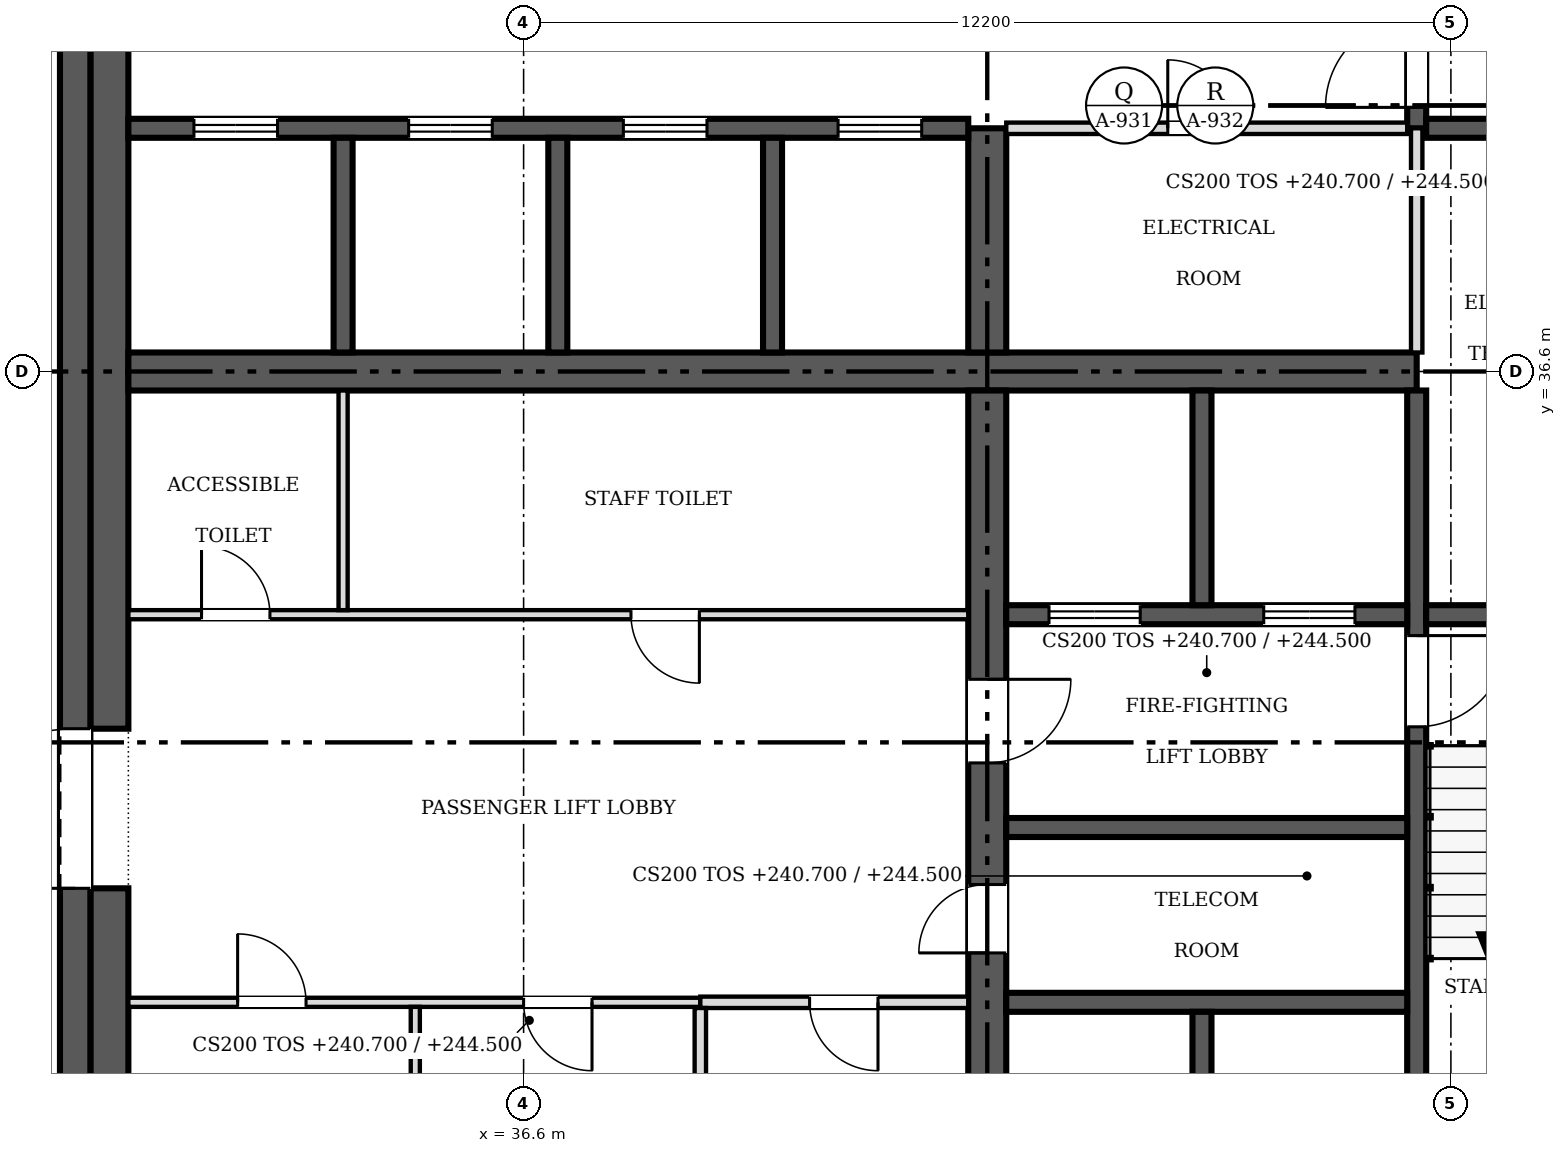
"""IFC4 building model, lengths in metres.
Left out: names, types, materials, properties, quantities, classifications, styles, units other than length and angle.
Written with IfcOpenShell. Run it as: python <this file> out.ifc"""

import sys

from ifc_helpers import new_model, si_unit, direction, frame, frame_2d, origin, place, context, subcontext, project, spatial, rectangle, extrude, source, transform, mapped, element, fill, save


model = new_model("IFC4")
c1 = context("Model", 3, precision=1e-05, world=origin(), true_north=direction((0.0, 1.0)))
c2 = subcontext(c1, "Body", "Model", "MODEL_VIEW")
j1 = project(units=[si_unit("LENGTHUNIT", "METRE"), si_unit("PLANEANGLEUNIT", "RADIAN")], contexts=[c1])
p1 = place(None, origin())
s1 = spatial("IfcSite", under=j1, at=p1, CompositionType="ELEMENT")
p2 = place(p1, origin())
s2 = spatial("IfcBuilding", under=s1, at=p2, CompositionType="ELEMENT")
p3 = place(p2, frame((0.0, 0.0, 240.7)))
s3 = spatial("IfcBuildingStorey", under=s2, at=p3, CompositionType="ELEMENT", Elevation=240.7)
p4 = place(p3, frame((30.7, 24.8, 0.0), z_axis=(0.0, 0.0, 1.0), x_axis=(0.0, 1.0, 0.0)))
e1 = element("IfcWall", 1, at=p4, inside=s3, PredefinedType="SHEAR", context=c2, shape_type="SweptSolid", body=[
    extrude(rectangle(XDim=23.6, YDim=0.4, at=frame_2d((11.8, 0.0))), origin(), (0.0, 0.0, 1.0), 3.8),
])
m1 = source(origin(), c2, "Body", "SweptSolid", [
    extrude(rectangle(XDim=2.1, YDim=2.4, at=frame_2d((1.05, 1.2))), frame((0.0, 0.21, 0.0), z_axis=(0.0, -1.0, 0.0), x_axis=(1.0, 0.0, 0.0)), (0.0, 0.0, 1.0), 0.42),
])
p5 = place(p4, frame((5.0, 0.0, 0.0)))
e2 = element("IfcOpeningElement", 2, at=p5, cuts=e1, PredefinedType="OPENING", context=c2, shape_type="MappedRepresentation", body=[
    mapped(m1, transform((0.0, 0.0, 0.0), scale=1.0)),
])
p6 = place(p4, frame((16.5, 0.0, 0.0)))
e3 = element("IfcOpeningElement", 3, at=p6, cuts=e1, PredefinedType="OPENING", context=c2, shape_type="MappedRepresentation", body=[
    mapped(m1, transform((0.0, 0.0, 0.0), scale=1.0)),
])
p7 = place(p3, frame((31.15, 25.3, 0.0), z_axis=(0.0, 0.0, 1.0), x_axis=(0.0, 1.0, 0.0)))
e4 = element("IfcWall", 4, at=p7, inside=s3, PredefinedType="SOLIDWALL", context=c2, shape_type="SweptSolid", body=[
    extrude(rectangle(XDim=4.5, YDim=0.5, at=frame_2d((2.25, 0.0))), origin(), (0.0, 0.0, 1.0), 3.8),
])
p8 = place(p3, frame((31.15, 31.9, 0.0), z_axis=(0.0, 0.0, 1.0), x_axis=(0.0, 1.0, 0.0)))
e5 = element("IfcWall", 5, at=p8, inside=s3, PredefinedType="SOLIDWALL", context=c2, shape_type="SweptSolid", body=[
    extrude(rectangle(XDim=9.4, YDim=0.5, at=frame_2d((4.7, 0.0))), origin(), (0.0, 0.0, 1.0), 3.8),
])
p9 = place(p3, frame((31.4, 36.6, 0.0), z_axis=(0.0, 0.0, 1.0), x_axis=(1.0, 0.0, 0.0)))
e6 = element("IfcWall", 6, at=p9, inside=s3, PredefinedType="SHEAR", context=c2, shape_type="SweptSolid", body=[
    extrude(rectangle(XDim=16.95, YDim=0.5, at=frame_2d((8.475, 0.0))), origin(), (0.0, 0.0, 1.0), 3.8),
])
p10 = place(p3, frame((42.7, 36.35, 0.0), z_axis=(0.0, 0.0, 1.0), x_axis=(0.0, -1.0, 0.0)))
e7 = element("IfcWall", 7, at=p10, inside=s3, PredefinedType="SHEAR", context=c2, shape_type="SweptSolid", body=[
    extrude(rectangle(XDim=11.05, YDim=0.5, at=frame_2d((5.525, 0.0))), origin(), (0.0, 0.0, 1.0), 3.8),
])
m2 = source(origin(), c2, "Body", "SweptSolid", [
    extrude(rectangle(XDim=0.9, YDim=2.1, at=frame_2d((0.45, 1.05))), frame((0.0, 0.26, 0.0), z_axis=(0.0, -1.0, 0.0), x_axis=(1.0, 0.0, 0.0)), (0.0, 0.0, 1.0), 0.52),
])
p11 = place(p10, frame((6.5, 0.0, 0.0)))
e8 = element("IfcOpeningElement", 8, at=p11, cuts=e7, PredefinedType="OPENING", context=c2, shape_type="MappedRepresentation", body=[
    mapped(m2, transform((0.0, 0.0, 0.0), scale=1.0)),
])
m3 = source(origin(), c2, "Body", "SweptSolid", [
    extrude(rectangle(XDim=1.1, YDim=2.1, at=frame_2d((0.55, 1.05))), frame((0.0, 0.26, 0.0), z_axis=(0.0, -1.0, 0.0), x_axis=(1.0, 0.0, 0.0)), (0.0, 0.0, 1.0), 0.52),
])
p12 = place(p10, frame((3.8, 0.0, 0.0)))
e9 = element("IfcOpeningElement", 9, at=p12, cuts=e7, PredefinedType="OPENING", context=c2, shape_type="MappedRepresentation", body=[
    mapped(m3, transform((0.0, 0.0, 0.0), scale=1.0)),
])
p13 = place(p3, frame((42.7, 36.85, 0.0), z_axis=(0.0, 0.0, 1.0), x_axis=(0.0, 1.0, 0.0)))
e10 = element("IfcWall", 10, at=p13, inside=s3, PredefinedType="SHEAR", context=c2, shape_type="SweptSolid", body=[
    extrude(rectangle(XDim=2.95, YDim=0.5, at=frame_2d((1.475, 0.0))), origin(), (0.0, 0.0, 1.0), 3.8),
])
p14 = place(p3, frame((31.4, 39.8, 0.0), z_axis=(0.0, 0.0, 1.0), x_axis=(1.0, 0.0, 0.0)))
e11 = element("IfcWall", 11, at=p14, inside=s3, PredefinedType="SOLIDWALL", context=c2, shape_type="SweptSolid", body=[
    extrude(rectangle(XDim=11.05, YDim=0.25, at=frame_2d((5.525, 0.0))), origin(), (0.0, 0.0, 1.0), 3.8),
])
m4 = source(origin(), c2, "Body", "SweptSolid", [
    extrude(rectangle(XDim=1.1, YDim=2.1, at=frame_2d((0.55, 1.05))), frame((0.0, 0.135, 0.0), z_axis=(0.0, -1.0, 0.0), x_axis=(1.0, 0.0, 0.0)), (0.0, 0.0, 1.0), 0.27),
])
p15 = place(p14, frame((0.863, 0.0, 0.0)))
e12 = element("IfcOpeningElement", 12, at=p15, cuts=e11, PredefinedType="OPENING", context=c2, shape_type="MappedRepresentation", body=[
    mapped(m4, transform((0.0, 0.0, 0.0), scale=1.0)),
])
p16 = place(p14, frame((3.688, 0.0, 0.0)))
e13 = element("IfcOpeningElement", 13, at=p16, cuts=e11, PredefinedType="OPENING", context=c2, shape_type="MappedRepresentation", body=[
    mapped(m4, transform((0.0, 0.0, 0.0), scale=1.0)),
])
p17 = place(p14, frame((6.512, 0.0, 0.0)))
e14 = element("IfcOpeningElement", 14, at=p17, cuts=e11, PredefinedType="OPENING", context=c2, shape_type="MappedRepresentation", body=[
    mapped(m4, transform((0.0, 0.0, 0.0), scale=1.0)),
])
p18 = place(p14, frame((9.337, 0.0, 0.0)))
e15 = element("IfcOpeningElement", 15, at=p18, cuts=e11, PredefinedType="OPENING", context=c2, shape_type="MappedRepresentation", body=[
    mapped(m4, transform((0.0, 0.0, 0.0), scale=1.0)),
])
p19 = place(p3, frame((48.35, 36.35, 0.0), z_axis=(0.0, 0.0, 1.0), x_axis=(0.0, -1.0, 0.0)))
e16 = element("IfcWall", 16, at=p19, inside=s3, PredefinedType="SOLIDWALL", context=c2, shape_type="SweptSolid", body=[
    extrude(rectangle(XDim=11.05, YDim=0.25, at=frame_2d((5.525, 0.0))), origin(), (0.0, 0.0, 1.0), 3.8),
])
m5 = source(origin(), c2, "Body", "SweptSolid", [
    extrude(rectangle(XDim=1.2, YDim=2.1, at=frame_2d((0.6, 1.05))), frame((0.0, 0.135, 0.0), z_axis=(0.0, -1.0, 0.0), x_axis=(1.0, 0.0, 0.0)), (0.0, 0.0, 1.0), 0.27),
])
p20 = place(p19, frame((3.225, 0.0, 0.0)))
e17 = element("IfcOpeningElement", 17, at=p20, cuts=e16, PredefinedType="OPENING", context=c2, shape_type="MappedRepresentation", body=[
    mapped(m5, transform((0.0, 0.0, 0.0), scale=1.0)),
])
p21 = place(p3, frame((48.225, 33.4, 0.0), z_axis=(0.0, 0.0, 1.0), x_axis=(-1.0, 0.0, 0.0)))
e18 = element("IfcWall", 18, at=p21, inside=s3, PredefinedType="SOLIDWALL", context=c2, shape_type="SweptSolid", body=[
    extrude(rectangle(XDim=5.275, YDim=0.25, at=frame_2d((2.638, 0.0))), origin(), (0.0, 0.0, 1.0), 3.8),
])
p22 = place(p21, frame((3.512, 0.0, 0.0)))
e19 = element("IfcOpeningElement", 19, at=p22, cuts=e18, PredefinedType="OPENING", context=c2, shape_type="MappedRepresentation", body=[
    mapped(m5, transform((0.0, 0.0, 0.0), scale=1.0)),
])
p23 = place(p21, frame((0.688, 0.0, 0.0)))
e20 = element("IfcOpeningElement", 20, at=p23, cuts=e18, PredefinedType="OPENING", context=c2, shape_type="MappedRepresentation", body=[
    mapped(m5, transform((0.0, 0.0, 0.0), scale=1.0)),
])
p24 = place(p3, frame((48.475, 33.4, 0.0), z_axis=(0.0, 0.0, 1.0), x_axis=(1.0, 0.0, 0.0)))
e21 = element("IfcWall", 21, at=p24, inside=s3, PredefinedType="SOLIDWALL", context=c2, shape_type="SweptSolid", body=[
    extrude(rectangle(XDim=3.525, YDim=0.25, at=frame_2d((1.762, 0.0))), origin(), (0.0, 0.0, 1.0), 3.8),
])
p25 = place(p3, frame((48.35, 47.9, 0.0), z_axis=(0.0, 0.0, 1.0), x_axis=(0.0, -1.0, 0.0)))
e22 = element("IfcWall", 22, at=p25, inside=s3, PredefinedType="SOLIDWALL", context=c2, shape_type="SweptSolid", body=[
    extrude(rectangle(XDim=8.1, YDim=0.25, at=frame_2d((4.05, 0.0))), origin(), (0.0, 0.0, 1.0), 3.8),
])
p26 = place(p25, frame((6.625, 0.0, 0.0)))
e23 = element("IfcOpeningElement", 23, at=p26, cuts=e22, PredefinedType="OPENING", context=c2, shape_type="MappedRepresentation", body=[
    mapped(m5, transform((0.0, 0.0, 0.0), scale=1.0)),
])
for number, where, z_axis, x_axis in (
    (24, (42.95, 28.3, 0.0), (0.0, 0.0, 1.0), (1.0, 0.0, 0.0)),
    (25, (42.95, 30.6, 0.0), (0.0, 0.0, 1.0), (1.0, 0.0, 0.0)),
):
    element("IfcWall", number, at=place(p3, frame(where, z_axis=z_axis, x_axis=x_axis)), inside=s3, PredefinedType="SOLIDWALL", context=c2, shape_type="SweptSolid", body=[
        extrude(rectangle(XDim=5.275, YDim=0.25, at=frame_2d((2.638, 0.0))), origin(), (0.0, 0.0, 1.0), 3.8),
    ])
p27 = place(p3, frame((48.475, 39.8, 0.0), z_axis=(0.0, 0.0, 1.0), x_axis=(1.0, 0.0, 0.0)))
e26 = element("IfcWall", 26, at=p27, inside=s3, PredefinedType="SOLIDWALL", context=c2, shape_type="SweptSolid", body=[
    extrude(rectangle(XDim=3.4, YDim=0.25, at=frame_2d((1.7, 0.0))), origin(), (0.0, 0.0, 1.0), 3.8),
])
for number, where, z_axis, x_axis in (
    (27, (34.225, 36.85, 0.0), (0.0, 0.0, 1.0), (0.0, 1.0, 0.0)),
    (28, (37.05, 36.85, 0.0), (0.0, 0.0, 1.0), (0.0, 1.0, 0.0)),
    (29, (39.875, 36.85, 0.0), (0.0, 0.0, 1.0), (0.0, 1.0, 0.0)),
):
    element("IfcWall", number, at=place(p3, frame(where, z_axis=z_axis, x_axis=x_axis)), inside=s3, PredefinedType="SOLIDWALL", context=c2, shape_type="SweptSolid", body=[
        extrude(rectangle(XDim=2.825, YDim=0.25, at=frame_2d((1.413, 0.0))), origin(), (0.0, 0.0, 1.0), 3.8),
    ])
p28 = place(p3, frame((45.525, 33.525, 0.0), z_axis=(0.0, 0.0, 1.0), x_axis=(0.0, 1.0, 0.0)))
e30 = element("IfcWall", 30, at=p28, inside=s3, PredefinedType="SOLIDWALL", context=c2, shape_type="SweptSolid", body=[
    extrude(rectangle(XDim=2.825, YDim=0.25, at=frame_2d((1.413, 0.0))), origin(), (0.0, 0.0, 1.0), 3.8),
])
p29 = place(p3, frame((45.525, 25.3, 0.0), z_axis=(0.0, 0.0, 1.0), x_axis=(0.0, 1.0, 0.0)))
e31 = element("IfcWall", 31, at=p29, inside=s3, PredefinedType="SOLIDWALL", context=c2, shape_type="SweptSolid", body=[
    extrude(rectangle(XDim=2.875, YDim=0.25, at=frame_2d((1.438, 0.0))), origin(), (0.0, 0.0, 1.0), 3.8),
])
p30 = place(p3, frame((31.4, 33.4, 0.0), z_axis=(0.0, 0.0, 1.0), x_axis=(1.0, 0.0, 0.0)))
e32 = element("IfcWall", 32, at=p30, inside=s3, PredefinedType="PARTITIONING", context=c2, shape_type="SweptSolid", body=[
    extrude(rectangle(XDim=11.05, YDim=0.12, at=frame_2d((5.525, 0.0))), origin(), (0.0, 0.0, 1.0), 3.6),
])
m6 = source(origin(), c2, "Body", "SweptSolid", [
    extrude(rectangle(XDim=0.9, YDim=2.1, at=frame_2d((0.45, 1.05))), frame((0.0, 0.07, 0.0), z_axis=(0.0, -1.0, 0.0), x_axis=(1.0, 0.0, 0.0)), (0.0, 0.0, 1.0), 0.14),
])
p31 = place(p30, frame((0.962, 0.0, 0.0)))
e33 = element("IfcOpeningElement", 33, at=p31, cuts=e32, PredefinedType="OPENING", context=c2, shape_type="MappedRepresentation", body=[
    mapped(m6, transform((0.0, 0.0, 0.0), scale=1.0)),
])
p32 = place(p30, frame((6.613, 0.0, 0.0)))
e34 = element("IfcOpeningElement", 34, at=p32, cuts=e32, PredefinedType="OPENING", context=c2, shape_type="MappedRepresentation", body=[
    mapped(m6, transform((0.0, 0.0, 0.0), scale=1.0)),
])
p33 = place(p3, frame((38.925, 28.3, 0.0), z_axis=(0.0, 0.0, 1.0), x_axis=(-1.0, 0.0, 0.0)))
e35 = element("IfcWall", 35, at=p33, inside=s3, PredefinedType="PARTITIONING", context=c2, shape_type="SweptSolid", body=[
    extrude(rectangle(XDim=7.525, YDim=0.12, at=frame_2d((3.763, 0.0))), origin(), (0.0, 0.0, 1.0), 3.6),
])
p34 = place(p33, frame((5.188, 0.0, 0.0)))
e36 = element("IfcOpeningElement", 36, at=p34, cuts=e35, PredefinedType="OPENING", context=c2, shape_type="MappedRepresentation", body=[
    mapped(m6, transform((0.0, 0.0, 0.0), scale=1.0)),
])
p35 = place(p33, frame((1.425, 0.0, 0.0)))
e37 = element("IfcOpeningElement", 37, at=p35, cuts=e35, PredefinedType="OPENING", context=c2, shape_type="MappedRepresentation", body=[
    mapped(m6, transform((0.0, 0.0, 0.0), scale=1.0)),
])
p36 = place(p3, frame((48.225, 39.8, 0.0), z_axis=(0.0, 0.0, 1.0), x_axis=(-1.0, 0.0, 0.0)))
e38 = element("IfcWall", 38, at=p36, inside=s3, PredefinedType="PARTITIONING", context=c2, shape_type="SweptSolid", body=[
    extrude(rectangle(XDim=5.275, YDim=0.15, at=frame_2d((2.638, 0.0))), origin(), (0.0, 0.0, 1.0), 3.6),
])
m7 = source(origin(), c2, "Body", "SweptSolid", [
    extrude(rectangle(XDim=0.9, YDim=2.1, at=frame_2d((0.45, 1.05))), frame((0.0, 0.085, 0.0), z_axis=(0.0, -1.0, 0.0), x_axis=(1.0, 0.0, 0.0)), (0.0, 0.0, 1.0), 0.17),
])
p37 = place(p36, frame((2.25, 0.0, 0.0)))
e39 = element("IfcOpeningElement", 39, at=p37, cuts=e38, PredefinedType="OPENING", context=c2, shape_type="MappedRepresentation", body=[
    mapped(m7, transform((0.0, 0.0, 0.0), scale=1.0)),
])
p38 = place(p3, frame((42.45, 28.3, 0.0), z_axis=(0.0, 0.0, 1.0), x_axis=(-1.0, 0.0, 0.0)))
e40 = element("IfcWall", 40, at=p38, inside=s3, PredefinedType="PARTITIONING", context=c2, shape_type="SweptSolid", body=[
    extrude(rectangle(XDim=3.525, YDim=0.15, at=frame_2d((1.762, 0.0))), origin(), (0.0, 0.0, 1.0), 3.6),
])
p39 = place(p38, frame((1.188, 0.0, 0.0)))
e41 = element("IfcOpeningElement", 41, at=p39, cuts=e40, PredefinedType="OPENING", context=c2, shape_type="MappedRepresentation", body=[
    mapped(m7, transform((0.0, 0.0, 0.0), scale=1.0)),
])
p40 = place(p3, frame((48.35, 36.85, 0.0), z_axis=(0.0, 0.0, 1.0), x_axis=(0.0, 1.0, 0.0)))
e42 = element("IfcWall", 42, at=p40, inside=s3, PredefinedType="PARTITIONING", context=c2, shape_type="SweptSolid", body=[
    extrude(rectangle(XDim=2.95, YDim=0.15, at=frame_2d((1.475, 0.0))), origin(), (0.0, 0.0, 1.0), 3.6),
])
p41 = place(p3, frame((34.225, 33.46, 0.0), z_axis=(0.0, 0.0, 1.0), x_axis=(0.0, 1.0, 0.0)))
e43 = element("IfcWall", 43, at=p41, inside=s3, PredefinedType="PARTITIONING", context=c2, shape_type="SweptSolid", body=[
    extrude(rectangle(XDim=2.89, YDim=0.12, at=frame_2d((1.445, 0.0))), origin(), (0.0, 0.0, 1.0), 3.6),
])
p42 = place(p3, frame((35.175, 25.3, 0.0), z_axis=(0.0, 0.0, 1.0), x_axis=(0.0, 1.0, 0.0)))
e44 = element("IfcWall", 44, at=p42, inside=s3, PredefinedType="PARTITIONING", context=c2, shape_type="SweptSolid", body=[
    extrude(rectangle(XDim=2.94, YDim=0.12, at=frame_2d((1.47, 0.0))), origin(), (0.0, 0.0, 1.0), 3.6),
])
p43 = place(p3, frame((38.925, 25.3, 0.0), z_axis=(0.0, 0.0, 1.0), x_axis=(0.0, 1.0, 0.0)))
e45 = element("IfcWall", 45, at=p43, inside=s3, PredefinedType="PARTITIONING", context=c2, shape_type="SweptSolid", body=[
    extrude(rectangle(XDim=2.925, YDim=0.15, at=frame_2d((1.462, 0.0))), origin(), (0.0, 0.0, 1.0), 3.6),
])
m8 = source(origin(), c2, "Body", "SweptSolid", [
    extrude(rectangle(XDim=2.1, YDim=2.4, at=frame_2d((1.05, 1.2))), frame((0.0, 0.025, 0.0), z_axis=(0.0, -1.0, 0.0), x_axis=(1.0, 0.0, 0.0)), (0.0, 0.0, 1.0), 0.05),
])
p44 = place(p5, origin())
e46 = element("IfcDoor", 46, at=p44, inside=s3, OperationType="DOUBLE_DOOR_SINGLE_SWING", PredefinedType="DOOR", context=c2, shape_type="MappedRepresentation", body=[
    mapped(m8, transform((0.0, 0.0, 0.0), scale=1.0)),
])
fill(e2, e46)
m9 = source(origin(), c2, "Body", "SweptSolid", [
    extrude(rectangle(XDim=0.9, YDim=2.1, at=frame_2d((0.45, 1.05))), frame((0.0, 0.025, 0.0), z_axis=(0.0, -1.0, 0.0), x_axis=(1.0, 0.0, 0.0)), (0.0, 0.0, 1.0), 0.05),
])
p45 = place(p11, origin())
e47 = element("IfcDoor", 47, at=p45, inside=s3, OperationType="SINGLE_SWING_RIGHT", PredefinedType="DOOR", context=c2, shape_type="MappedRepresentation", body=[
    mapped(m9, transform((0.0, 0.0, 0.0), scale=1.0)),
])
fill(e8, e47)
m10 = source(origin(), c2, "Body", "SweptSolid", [
    extrude(rectangle(XDim=1.1, YDim=2.1, at=frame_2d((0.55, 1.05))), frame((0.0, 0.025, 0.0), z_axis=(0.0, -1.0, 0.0), x_axis=(1.0, 0.0, 0.0)), (0.0, 0.0, 1.0), 0.05),
])
p46 = place(p12, origin())
e48 = element("IfcDoor", 48, at=p46, inside=s3, OperationType="SINGLE_SWING_LEFT", PredefinedType="DOOR", context=c2, shape_type="MappedRepresentation", body=[
    mapped(m10, transform((0.0, 0.0, 0.0), scale=1.0)),
])
fill(e9, e48)
p47 = place(p15, origin())
e49 = element("IfcDoor", 49, at=p47, inside=s3, OperationType="DOUBLE_DOOR_SLIDING", PredefinedType="DOOR", context=c2, shape_type="MappedRepresentation", body=[
    mapped(m10, transform((0.0, 0.0, 0.0), scale=1.0)),
])
fill(e12, e49)
p48 = place(p16, origin())
e50 = element("IfcDoor", 50, at=p48, inside=s3, OperationType="DOUBLE_DOOR_SLIDING", PredefinedType="DOOR", context=c2, shape_type="MappedRepresentation", body=[
    mapped(m10, transform((0.0, 0.0, 0.0), scale=1.0)),
])
fill(e13, e50)
p49 = place(p17, origin())
e51 = element("IfcDoor", 51, at=p49, inside=s3, OperationType="DOUBLE_DOOR_SLIDING", PredefinedType="DOOR", context=c2, shape_type="MappedRepresentation", body=[
    mapped(m10, transform((0.0, 0.0, 0.0), scale=1.0)),
])
fill(e14, e51)
p50 = place(p18, origin())
e52 = element("IfcDoor", 52, at=p50, inside=s3, OperationType="DOUBLE_DOOR_SLIDING", PredefinedType="DOOR", context=c2, shape_type="MappedRepresentation", body=[
    mapped(m10, transform((0.0, 0.0, 0.0), scale=1.0)),
])
fill(e15, e52)
m11 = source(origin(), c2, "Body", "SweptSolid", [
    extrude(rectangle(XDim=1.2, YDim=2.1, at=frame_2d((0.6, 1.05))), frame((0.0, 0.025, 0.0), z_axis=(0.0, -1.0, 0.0), x_axis=(1.0, 0.0, 0.0)), (0.0, 0.0, 1.0), 0.05),
])
p51 = place(p20, origin())
e53 = element("IfcDoor", 53, at=p51, inside=s3, OperationType="SINGLE_SWING_LEFT", PredefinedType="DOOR", context=c2, shape_type="MappedRepresentation", body=[
    mapped(m11, transform((0.0, 0.0, 0.0), scale=1.0)),
])
fill(e17, e53)
p52 = place(p22, origin())
e54 = element("IfcDoor", 54, at=p52, inside=s3, OperationType="DOUBLE_DOOR_SLIDING", PredefinedType="DOOR", context=c2, shape_type="MappedRepresentation", body=[
    mapped(m11, transform((0.0, 0.0, 0.0), scale=1.0)),
])
fill(e19, e54)
p53 = place(p23, origin())
e55 = element("IfcDoor", 55, at=p53, inside=s3, OperationType="DOUBLE_DOOR_SLIDING", PredefinedType="DOOR", context=c2, shape_type="MappedRepresentation", body=[
    mapped(m11, transform((0.0, 0.0, 0.0), scale=1.0)),
])
fill(e20, e55)
p54 = place(p26, origin())
e56 = element("IfcDoor", 56, at=p54, inside=s3, OperationType="SINGLE_SWING_RIGHT", PredefinedType="DOOR", context=c2, shape_type="MappedRepresentation", body=[
    mapped(m11, transform((0.0, 0.0, 0.0), scale=1.0)),
])
fill(e23, e56)
p55 = place(p31, origin())
e57 = element("IfcDoor", 57, at=p55, inside=s3, OperationType="SINGLE_SWING_LEFT", PredefinedType="DOOR", context=c2, shape_type="MappedRepresentation", body=[
    mapped(m9, transform((0.0, 0.0, 0.0), scale=1.0)),
])
fill(e33, e57)
p56 = place(p32, origin())
e58 = element("IfcDoor", 58, at=p56, inside=s3, OperationType="SINGLE_SWING_RIGHT", PredefinedType="DOOR", context=c2, shape_type="MappedRepresentation", body=[
    mapped(m9, transform((0.0, 0.0, 0.0), scale=1.0)),
])
fill(e34, e58)
p57 = place(p34, origin())
e59 = element("IfcDoor", 59, at=p57, inside=s3, OperationType="SINGLE_SWING_RIGHT", PredefinedType="DOOR", context=c2, shape_type="MappedRepresentation", body=[
    mapped(m9, transform((0.0, 0.0, 0.0), scale=1.0)),
])
fill(e36, e59)
p58 = place(p35, origin())
e60 = element("IfcDoor", 60, at=p58, inside=s3, OperationType="SINGLE_SWING_LEFT", PredefinedType="DOOR", context=c2, shape_type="MappedRepresentation", body=[
    mapped(m9, transform((0.0, 0.0, 0.0), scale=1.0)),
])
fill(e37, e60)
p59 = place(p37, origin())
e61 = element("IfcDoor", 61, at=p59, inside=s3, OperationType="SINGLE_SWING_RIGHT", PredefinedType="DOOR", context=c2, shape_type="MappedRepresentation", body=[
    mapped(m9, transform((0.0, 0.0, 0.0), scale=1.0)),
])
fill(e39, e61)
p60 = place(p39, origin())
e62 = element("IfcDoor", 62, at=p60, inside=s3, OperationType="SINGLE_SWING_LEFT", PredefinedType="DOOR", context=c2, shape_type="MappedRepresentation", body=[
    mapped(m9, transform((0.0, 0.0, 0.0), scale=1.0)),
])
fill(e41, e62)
save(model, sys.argv[1])
